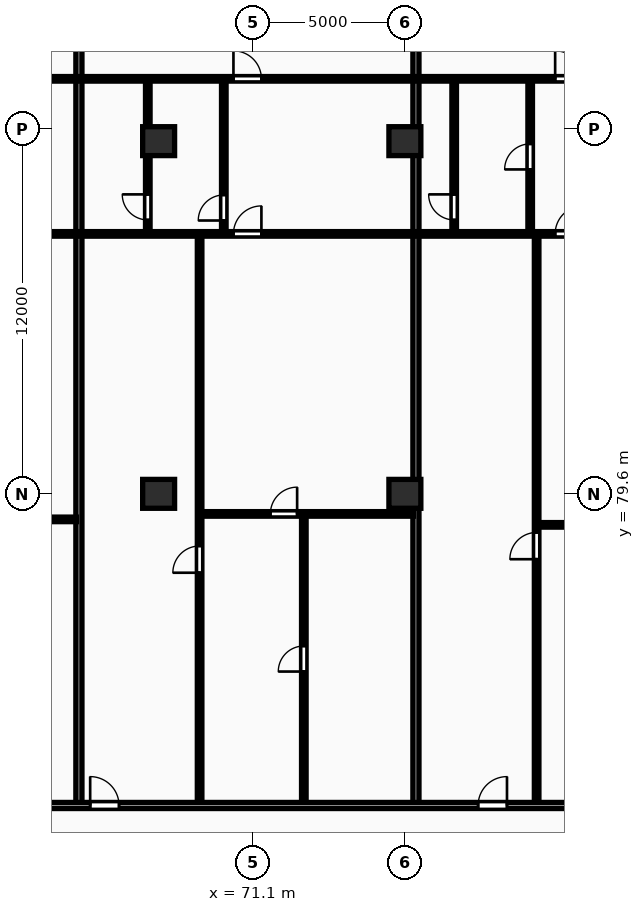
"""IFC4 building model, lengths in metres.
Left out: names, types, materials, properties, quantities, classifications, styles, units other than length and angle.
Written with IfcOpenShell. Run it as: python <this file> out.ifc"""

import sys

from ifc_helpers import new_model, si_unit, direction, frame, frame_2d, origin, origin_2d, place, context, subcontext, project, spatial, rectangle, extrude, element, fill, save


model = new_model("IFC4")
c1 = context("Model", 3, precision=1e-05, world=origin(), true_north=direction((0.0, 1.0)))
c2 = subcontext(c1, "Body", "Model", "MODEL_VIEW")
j1 = project(units=[si_unit("LENGTHUNIT", "METRE"), si_unit("PLANEANGLEUNIT", "RADIAN")], contexts=[c1])
p1 = place(None, origin())
s1 = spatial("IfcSite", under=j1, at=p1, CompositionType="ELEMENT")
p2 = place(p1, origin())
s2 = spatial("IfcBuilding", under=s1, at=p2, CompositionType="ELEMENT")
p3 = place(p2, frame((0.0, 0.0, 24.0)))
s3 = spatial("IfcBuildingStorey", under=s2, at=p3, CompositionType="ELEMENT", Elevation=24.0)
for number, where, z_axis, x_axis in (
    (1, (68.0, 79.6, 0.0), (0.0, 0.0, 1.0), (1.0, 0.0, 0.0)),
    (2, (68.0, 91.2, 0.0), (0.0, 0.0, 1.0), (1.0, 0.0, 0.0)),
    (3, (76.1, 79.6, 0.0), (0.0, 0.0, 1.0), (1.0, 0.0, 0.0)),
    (4, (76.1, 91.2, 0.0), (0.0, 0.0, 1.0), (1.0, 0.0, 0.0)),
):
    element("IfcColumn", number, at=place(p3, frame(where, z_axis=z_axis, x_axis=x_axis)), inside=s3, PredefinedType="COLUMN", context=c2, shape_type="SweptSolid", body=[
        extrude(rectangle(XDim=1.05, YDim=0.95, at=origin_2d()), origin(), (0.0, 0.0, 1.0), 3.25),
    ])
p4 = place(p3, frame((65.378, 69.43, 0.0), z_axis=(0.0, 0.0, 1.0), x_axis=(0.0, 1.0, 0.0)))
e5 = element("IfcWall", 5, at=p4, inside=s3, PredefinedType="PARTITIONING", context=c2, shape_type="SweptSolid", body=[
    extrude(rectangle(XDim=29.07, YDim=0.2, at=frame_2d((14.535, 0.0))), origin(), (0.0, 0.0, 1.0), 2.97),
])
p5 = place(p3, frame((59.33, 78.76, 0.0), z_axis=(0.0, 0.0, 1.0), x_axis=(1.0, 0.0, 0.0)))
e6 = element("IfcWall", 6, at=p5, inside=s3, PredefinedType="PARTITIONING", context=c2, shape_type="SweptSolid", body=[
    extrude(rectangle(XDim=5.968, YDim=0.15, at=frame_2d((2.984, 0.0))), origin(), (0.0, 0.0, 1.0), 2.97),
])
p6 = place(p5, frame((2.544, 0.0, 0.0)))
e7 = element("IfcOpeningElement", 7, at=p6, cuts=e6, PredefinedType="OPENING", context=c2, shape_type="SweptSolid", body=[
    extrude(rectangle(XDim=0.88, YDim=2.06, at=frame_2d((0.44, 1.03))), frame((0.0, 0.085, 0.0), z_axis=(0.0, -1.0, 0.0), x_axis=(1.0, 0.0, 0.0)), (0.0, 0.0, 1.0), 0.17),
])
p7 = place(p3, frame((55.38, 88.15, 0.0), z_axis=(0.0, 0.0, 1.0), x_axis=(1.0, 0.0, 0.0)))
e8 = element("IfcWall", 8, at=p7, inside=s3, PredefinedType="PARTITIONING", context=c2, shape_type="SweptSolid", body=[
    extrude(rectangle(XDim=9.918, YDim=0.15, at=frame_2d((4.959, 0.0))), origin(), (0.0, 0.0, 1.0), 2.97),
])
p8 = place(p7, frame((4.499, 0.0, 0.0)))
e9 = element("IfcOpeningElement", 9, at=p8, cuts=e8, PredefinedType="OPENING", context=c2, shape_type="SweptSolid", body=[
    extrude(rectangle(XDim=0.92, YDim=2.08, at=frame_2d((0.46, 1.04))), frame((0.0, 0.085, 0.0), z_axis=(0.0, -1.0, 0.0), x_axis=(1.0, 0.0, 0.0)), (0.0, 0.0, 1.0), 0.17),
])
p9 = place(p3, frame((55.38, 93.25, 0.0), z_axis=(0.0, 0.0, 1.0), x_axis=(1.0, 0.0, 0.0)))
e10 = element("IfcWall", 10, at=p9, inside=s3, PredefinedType="PARTITIONING", context=c2, shape_type="SweptSolid", body=[
    extrude(rectangle(XDim=9.918, YDim=0.15, at=frame_2d((4.959, 0.0))), origin(), (0.0, 0.0, 1.0), 2.97),
])
p10 = place(p9, frame((6.127, 0.0, 0.0)))
e11 = element("IfcOpeningElement", 11, at=p10, cuts=e10, PredefinedType="OPENING", context=c2, shape_type="SweptSolid", body=[
    extrude(rectangle(XDim=0.92, YDim=2.08, at=frame_2d((0.46, 1.04))), frame((0.0, 0.085, 0.0), z_axis=(0.0, -1.0, 0.0), x_axis=(1.0, 0.0, 0.0)), (0.0, 0.0, 1.0), 0.17),
])
p11 = place(p3, frame((76.464, 69.43, 0.0), z_axis=(0.0, 0.0, 1.0), x_axis=(0.0, 1.0, 0.0)))
e12 = element("IfcWall", 12, at=p11, inside=s3, PredefinedType="PARTITIONING", context=c2, shape_type="SweptSolid", body=[
    extrude(rectangle(XDim=29.07, YDim=0.2, at=frame_2d((14.535, 0.0))), origin(), (0.0, 0.0, 1.0), 2.22),
])
p12 = place(p3, frame((72.776, 69.41, 0.0), z_axis=(0.0, 0.0, 1.0), x_axis=(0.0, 1.0, 0.0)))
e13 = element("IfcWall", 13, at=p12, inside=s3, PredefinedType="PARTITIONING", context=c2, shape_type="SweptSolid", body=[
    extrude(rectangle(XDim=9.53, YDim=0.15, at=frame_2d((4.765, 0.0))), origin(), (0.0, 0.0, 1.0), 2.97),
])
p13 = place(p12, frame((4.345, 0.0, 0.0)))
e14 = element("IfcOpeningElement", 14, at=p13, cuts=e13, PredefinedType="OPENING", context=c2, shape_type="SweptSolid", body=[
    extrude(rectangle(XDim=0.84, YDim=2.04, at=frame_2d((0.42, 1.02))), frame((0.0, 0.085, 0.0), z_axis=(0.0, -1.0, 0.0), x_axis=(1.0, 0.0, 0.0)), (0.0, 0.0, 1.0), 0.17),
])
p14 = place(p3, frame((69.408, 78.94, 0.0), z_axis=(0.0, 0.0, 1.0), x_axis=(1.0, 0.0, 0.0)))
e15 = element("IfcWall", 15, at=p14, inside=s3, PredefinedType="PARTITIONING", context=c2, shape_type="SweptSolid", body=[
    extrude(rectangle(XDim=6.976, YDim=0.15, at=frame_2d((3.488, 0.0))), origin(), (0.0, 0.0, 1.0), 2.97),
])
p15 = place(p14, frame((2.268, 0.0, 0.0)))
e16 = element("IfcOpeningElement", 16, at=p15, cuts=e15, PredefinedType="OPENING", context=c2, shape_type="SweptSolid", body=[
    extrude(rectangle(XDim=0.88, YDim=2.06, at=frame_2d((0.44, 1.03))), frame((0.0, 0.085, 0.0), z_axis=(0.0, -1.0, 0.0), x_axis=(1.0, 0.0, 0.0)), (0.0, 0.0, 1.0), 0.17),
])
p16 = place(p3, frame((69.348, 69.41, 0.0), z_axis=(0.0, 0.0, 1.0), x_axis=(0.0, 1.0, 0.0)))
e17 = element("IfcWall", 17, at=p16, inside=s3, PredefinedType="PARTITIONING", context=c2, shape_type="SweptSolid", body=[
    extrude(rectangle(XDim=18.7, YDim=0.15, at=frame_2d((9.35, 0.0))), origin(), (0.0, 0.0, 1.0), 2.97),
])
p17 = place(p16, frame((7.595, 0.0, 0.0)))
e18 = element("IfcOpeningElement", 18, at=p17, cuts=e17, PredefinedType="OPENING", context=c2, shape_type="SweptSolid", body=[
    extrude(rectangle(XDim=0.88, YDim=2.06, at=frame_2d((0.44, 1.03))), frame((0.0, 0.085, 0.0), z_axis=(0.0, -1.0, 0.0), x_axis=(1.0, 0.0, 0.0)), (0.0, 0.0, 1.0), 0.17),
])
p18 = place(p3, frame((67.644, 88.19, 0.0), z_axis=(0.0, 0.0, 1.0), x_axis=(0.0, 1.0, 0.0)))
e19 = element("IfcWall", 19, at=p18, inside=s3, PredefinedType="PARTITIONING", context=c2, shape_type="SweptSolid", body=[
    extrude(rectangle(XDim=5.0, YDim=0.15, at=frame_2d((2.5, 0.0))), origin(), (0.0, 0.0, 1.0), 2.22),
])
p19 = place(p18, frame((0.419, 0.0, 0.0)))
e20 = element("IfcOpeningElement", 20, at=p19, cuts=e19, PredefinedType="OPENING", context=c2, shape_type="SweptSolid", body=[
    extrude(rectangle(XDim=0.84, YDim=2.04, at=frame_2d((0.42, 1.02))), frame((0.0, 0.085, 0.0), z_axis=(0.0, -1.0, 0.0), x_axis=(1.0, 0.0, 0.0)), (0.0, 0.0, 1.0), 0.17),
])
p20 = place(p3, frame((70.144, 88.19, 0.0), z_axis=(0.0, 0.0, 1.0), x_axis=(0.0, 1.0, 0.0)))
e21 = element("IfcWall", 21, at=p20, inside=s3, PredefinedType="PARTITIONING", context=c2, shape_type="SweptSolid", body=[
    extrude(rectangle(XDim=5.0, YDim=0.15, at=frame_2d((2.5, 0.0))), origin(), (0.0, 0.0, 1.0), 2.97),
])
p21 = place(p20, frame((0.4, 0.0, 0.0)))
e22 = element("IfcOpeningElement", 22, at=p21, cuts=e21, PredefinedType="OPENING", context=c2, shape_type="SweptSolid", body=[
    extrude(rectangle(XDim=0.84, YDim=2.04, at=frame_2d((0.42, 1.02))), frame((0.0, 0.085, 0.0), z_axis=(0.0, -1.0, 0.0), x_axis=(1.0, 0.0, 0.0)), (0.0, 0.0, 1.0), 0.17),
])
p22 = place(p3, frame((65.458, 88.15, 0.0), z_axis=(0.0, 0.0, 1.0), x_axis=(1.0, 0.0, 0.0)))
e23 = element("IfcWall", 23, at=p22, inside=s3, PredefinedType="PARTITIONING", context=c2, shape_type="SweptSolid", body=[
    extrude(rectangle(XDim=10.926, YDim=0.15, at=frame_2d((5.463, 0.0))), origin(), (0.0, 0.0, 1.0), 2.97),
])
p23 = place(p22, frame((5.003, 0.0, 0.0)))
e24 = element("IfcOpeningElement", 24, at=p23, cuts=e23, PredefinedType="OPENING", context=c2, shape_type="SweptSolid", body=[
    extrude(rectangle(XDim=0.92, YDim=2.08, at=frame_2d((0.46, 1.04))), frame((0.0, 0.085, 0.0), z_axis=(0.0, -1.0, 0.0), x_axis=(1.0, 0.0, 0.0)), (0.0, 0.0, 1.0), 0.17),
])
p24 = place(p3, frame((65.458, 93.25, 0.0), z_axis=(0.0, 0.0, 1.0), x_axis=(1.0, 0.0, 0.0)))
e25 = element("IfcWall", 25, at=p24, inside=s3, PredefinedType="PARTITIONING", context=c2, shape_type="SweptSolid", body=[
    extrude(rectangle(XDim=10.926, YDim=0.15, at=frame_2d((5.463, 0.0))), origin(), (0.0, 0.0, 1.0), 2.97),
])
p25 = place(p24, frame((5.003, 0.0, 0.0)))
e26 = element("IfcOpeningElement", 26, at=p25, cuts=e25, PredefinedType="OPENING", context=c2, shape_type="SweptSolid", body=[
    extrude(rectangle(XDim=0.92, YDim=2.08, at=frame_2d((0.46, 1.04))), frame((0.0, 0.085, 0.0), z_axis=(0.0, -1.0, 0.0), x_axis=(1.0, 0.0, 0.0)), (0.0, 0.0, 1.0), 0.17),
])
p26 = place(p3, frame((80.494, 78.58, 0.0), z_axis=(0.0, 0.0, 1.0), x_axis=(1.0, 0.0, 0.0)))
e27 = element("IfcWall", 27, at=p26, inside=s3, PredefinedType="PARTITIONING", context=c2, shape_type="SweptSolid", body=[
    extrude(rectangle(XDim=5.968, YDim=0.15, at=frame_2d((2.984, 0.0))), origin(), (0.0, 0.0, 1.0), 2.97),
])
p27 = place(p26, frame((1.403, 0.0, 0.0)))
e28 = element("IfcOpeningElement", 28, at=p27, cuts=e27, PredefinedType="OPENING", context=c2, shape_type="SweptSolid", body=[
    extrude(rectangle(XDim=0.88, YDim=2.06, at=frame_2d((0.44, 1.03))), frame((0.0, 0.085, 0.0), z_axis=(0.0, -1.0, 0.0), x_axis=(1.0, 0.0, 0.0)), (0.0, 0.0, 1.0), 0.17),
])
p28 = place(p3, frame((80.434, 69.41, 0.0), z_axis=(0.0, 0.0, 1.0), x_axis=(0.0, 1.0, 0.0)))
e29 = element("IfcWall", 29, at=p28, inside=s3, PredefinedType="PARTITIONING", context=c2, shape_type="SweptSolid", body=[
    extrude(rectangle(XDim=18.7, YDim=0.15, at=frame_2d((9.35, 0.0))), origin(), (0.0, 0.0, 1.0), 2.97),
])
p29 = place(p28, frame((8.04, 0.0, 0.0)))
e30 = element("IfcOpeningElement", 30, at=p29, cuts=e29, PredefinedType="OPENING", context=c2, shape_type="SweptSolid", body=[
    extrude(rectangle(XDim=0.88, YDim=2.06, at=frame_2d((0.44, 1.03))), frame((0.0, 0.085, 0.0), z_axis=(0.0, -1.0, 0.0), x_axis=(1.0, 0.0, 0.0)), (0.0, 0.0, 1.0), 0.17),
])
p30 = place(p3, frame((77.721, 88.19, 0.0), z_axis=(0.0, 0.0, 1.0), x_axis=(0.0, 1.0, 0.0)))
e31 = element("IfcWall", 31, at=p30, inside=s3, PredefinedType="PARTITIONING", context=c2, shape_type="SweptSolid", body=[
    extrude(rectangle(XDim=5.0, YDim=0.15, at=frame_2d((2.5, 0.0))), origin(), (0.0, 0.0, 1.0), 2.97),
])
p31 = place(p30, frame((0.419, 0.0, 0.0)))
e32 = element("IfcOpeningElement", 32, at=p31, cuts=e31, PredefinedType="OPENING", context=c2, shape_type="SweptSolid", body=[
    extrude(rectangle(XDim=0.84, YDim=2.04, at=frame_2d((0.42, 1.02))), frame((0.0, 0.085, 0.0), z_axis=(0.0, -1.0, 0.0), x_axis=(1.0, 0.0, 0.0)), (0.0, 0.0, 1.0), 0.17),
])
p32 = place(p3, frame((80.221, 88.19, 0.0), z_axis=(0.0, 0.0, 1.0), x_axis=(0.0, 1.0, 0.0)))
e33 = element("IfcWall", 33, at=p32, inside=s3, PredefinedType="PARTITIONING", context=c2, shape_type="SweptSolid", body=[
    extrude(rectangle(XDim=5.0, YDim=0.15, at=frame_2d((2.5, 0.0))), origin(), (0.0, 0.0, 1.0), 2.97),
])
p33 = place(p32, frame((2.08, 0.0, 0.0)))
e34 = element("IfcOpeningElement", 34, at=p33, cuts=e33, PredefinedType="OPENING", context=c2, shape_type="SweptSolid", body=[
    extrude(rectangle(XDim=0.84, YDim=2.04, at=frame_2d((0.42, 1.02))), frame((0.0, 0.085, 0.0), z_axis=(0.0, -1.0, 0.0), x_axis=(1.0, 0.0, 0.0)), (0.0, 0.0, 1.0), 0.17),
])
p34 = place(p3, frame((76.544, 88.15, 0.0), z_axis=(0.0, 0.0, 1.0), x_axis=(1.0, 0.0, 0.0)))
e35 = element("IfcWall", 35, at=p34, inside=s3, PredefinedType="PARTITIONING", context=c2, shape_type="SweptSolid", body=[
    extrude(rectangle(XDim=9.918, YDim=0.15, at=frame_2d((4.959, 0.0))), origin(), (0.0, 0.0, 1.0), 2.97),
])
p35 = place(p34, frame((4.499, 0.0, 0.0)))
e36 = element("IfcOpeningElement", 36, at=p35, cuts=e35, PredefinedType="OPENING", context=c2, shape_type="SweptSolid", body=[
    extrude(rectangle(XDim=0.92, YDim=2.08, at=frame_2d((0.46, 1.04))), frame((0.0, 0.085, 0.0), z_axis=(0.0, -1.0, 0.0), x_axis=(1.0, 0.0, 0.0)), (0.0, 0.0, 1.0), 0.17),
])
p36 = place(p3, frame((76.544, 93.25, 0.0), z_axis=(0.0, 0.0, 1.0), x_axis=(1.0, 0.0, 0.0)))
e37 = element("IfcWall", 37, at=p36, inside=s3, PredefinedType="PARTITIONING", context=c2, shape_type="SweptSolid", body=[
    extrude(rectangle(XDim=9.918, YDim=0.15, at=frame_2d((4.959, 0.0))), origin(), (0.0, 0.0, 1.0), 2.97),
])
p37 = place(p36, frame((4.499, 0.0, 0.0)))
e38 = element("IfcOpeningElement", 38, at=p37, cuts=e37, PredefinedType="OPENING", context=c2, shape_type="SweptSolid", body=[
    extrude(rectangle(XDim=0.92, YDim=2.08, at=frame_2d((0.46, 1.04))), frame((0.0, 0.085, 0.0), z_axis=(0.0, -1.0, 0.0), x_axis=(1.0, 0.0, 0.0)), (0.0, 0.0, 1.0), 0.17),
])
p38 = place(p3, frame((55.3, 69.35, 0.0), z_axis=(0.0, 0.0, 1.0), x_axis=(1.0, 0.0, 0.0)))
e39 = element("IfcWall", 39, at=p38, inside=s3, PredefinedType="PARTITIONING", context=c2, shape_type="SweptSolid", body=[
    extrude(rectangle(XDim=77.6, YDim=0.2, at=frame_2d((38.8, 0.0))), origin(), (0.0, 0.0, 1.0), 2.97),
])
p39 = place(p38, frame((1.81, 0.0, 0.0)))
e40 = element("IfcOpeningElement", 40, at=p39, cuts=e39, PredefinedType="OPENING", context=c2, shape_type="SweptSolid", body=[
    extrude(rectangle(XDim=0.95, YDim=2.15, at=frame_2d((0.475, 1.075))), frame((0.0, 0.11, 0.0), z_axis=(0.0, -1.0, 0.0), x_axis=(1.0, 0.0, 0.0)), (0.0, 0.0, 1.0), 0.22),
])
p40 = place(p38, frame((10.448, 0.0, 0.0)))
e41 = element("IfcOpeningElement", 41, at=p40, cuts=e39, PredefinedType="OPENING", context=c2, shape_type="SweptSolid", body=[
    extrude(rectangle(XDim=0.95, YDim=2.15, at=frame_2d((0.475, 1.075))), frame((0.0, 0.11, 0.0), z_axis=(0.0, -1.0, 0.0), x_axis=(1.0, 0.0, 0.0)), (0.0, 0.0, 1.0), 0.22),
])
p41 = place(p38, frame((23.208, 0.0, 0.0)))
e42 = element("IfcOpeningElement", 42, at=p41, cuts=e39, PredefinedType="OPENING", context=c2, shape_type="SweptSolid", body=[
    extrude(rectangle(XDim=0.95, YDim=2.15, at=frame_2d((0.475, 1.075))), frame((0.0, 0.11, 0.0), z_axis=(0.0, -1.0, 0.0), x_axis=(1.0, 0.0, 0.0)), (0.0, 0.0, 1.0), 0.22),
])
p42 = place(p38, frame((33.287, 0.0, 0.0)))
e43 = element("IfcOpeningElement", 43, at=p42, cuts=e39, PredefinedType="OPENING", context=c2, shape_type="SweptSolid", body=[
    extrude(rectangle(XDim=0.95, YDim=2.15, at=frame_2d((0.475, 1.075))), frame((0.0, 0.11, 0.0), z_axis=(0.0, -1.0, 0.0), x_axis=(1.0, 0.0, 0.0)), (0.0, 0.0, 1.0), 0.22),
])
p43 = place(p38, frame((44.905, 0.0, 0.0)))
e44 = element("IfcOpeningElement", 44, at=p43, cuts=e39, PredefinedType="OPENING", context=c2, shape_type="SweptSolid", body=[
    extrude(rectangle(XDim=0.95, YDim=2.15, at=frame_2d((0.475, 1.075))), frame((0.0, 0.11, 0.0), z_axis=(0.0, -1.0, 0.0), x_axis=(1.0, 0.0, 0.0)), (0.0, 0.0, 1.0), 0.22),
])
p44 = place(p38, frame((54.119, 0.0, 0.0)))
e45 = element("IfcOpeningElement", 45, at=p44, cuts=e39, PredefinedType="OPENING", context=c2, shape_type="SweptSolid", body=[
    extrude(rectangle(XDim=0.95, YDim=2.15, at=frame_2d((0.475, 1.075))), frame((0.0, 0.11, 0.0), z_axis=(0.0, -1.0, 0.0), x_axis=(1.0, 0.0, 0.0)), (0.0, 0.0, 1.0), 0.22),
])
p45 = place(p38, frame((66.74, 0.0, 0.0)))
e46 = element("IfcOpeningElement", 46, at=p45, cuts=e39, PredefinedType="OPENING", context=c2, shape_type="SweptSolid", body=[
    extrude(rectangle(XDim=0.95, YDim=2.15, at=frame_2d((0.475, 1.075))), frame((0.0, 0.11, 0.0), z_axis=(0.0, -1.0, 0.0), x_axis=(1.0, 0.0, 0.0)), (0.0, 0.0, 1.0), 0.22),
])
p46 = place(p13, origin())
e47 = element("IfcDoor", 47, at=p46, inside=s3, OperationType="SINGLE_SWING_LEFT", PredefinedType="DOOR", context=c2, shape_type="SweptSolid", body=[
    extrude(rectangle(XDim=0.84, YDim=2.04, at=frame_2d((0.42, 1.02))), frame((0.0, 0.025, 0.0), z_axis=(0.0, -1.0, 0.0), x_axis=(1.0, 0.0, 0.0)), (0.0, 0.0, 1.0), 0.05),
])
fill(e14, e47)
p47 = place(p15, origin())
e48 = element("IfcDoor", 48, at=p47, inside=s3, OperationType="SINGLE_SWING_RIGHT", PredefinedType="DOOR", context=c2, shape_type="SweptSolid", body=[
    extrude(rectangle(XDim=0.88, YDim=2.06, at=frame_2d((0.44, 1.03))), frame((0.0, 0.025, 0.0), z_axis=(0.0, -1.0, 0.0), x_axis=(1.0, 0.0, 0.0)), (0.0, 0.0, 1.0), 0.05),
])
fill(e16, e48)
p48 = place(p17, origin())
e49 = element("IfcDoor", 49, at=p48, inside=s3, OperationType="SINGLE_SWING_LEFT", PredefinedType="DOOR", context=c2, shape_type="SweptSolid", body=[
    extrude(rectangle(XDim=0.88, YDim=2.06, at=frame_2d((0.44, 1.03))), frame((0.0, 0.025, 0.0), z_axis=(0.0, -1.0, 0.0), x_axis=(1.0, 0.0, 0.0)), (0.0, 0.0, 1.0), 0.05),
])
fill(e18, e49)
p49 = place(p19, origin())
e50 = element("IfcDoor", 50, at=p49, inside=s3, OperationType="SINGLE_SWING_RIGHT", PredefinedType="DOOR", context=c2, shape_type="SweptSolid", body=[
    extrude(rectangle(XDim=0.84, YDim=2.04, at=frame_2d((0.42, 1.02))), frame((0.0, 0.025, 0.0), z_axis=(0.0, -1.0, 0.0), x_axis=(1.0, 0.0, 0.0)), (0.0, 0.0, 1.0), 0.05),
])
fill(e20, e50)
p50 = place(p21, origin())
e51 = element("IfcDoor", 51, at=p50, inside=s3, OperationType="SINGLE_SWING_LEFT", PredefinedType="DOOR", context=c2, shape_type="SweptSolid", body=[
    extrude(rectangle(XDim=0.84, YDim=2.04, at=frame_2d((0.42, 1.02))), frame((0.0, 0.025, 0.0), z_axis=(0.0, -1.0, 0.0), x_axis=(1.0, 0.0, 0.0)), (0.0, 0.0, 1.0), 0.05),
])
fill(e22, e51)
p51 = place(p23, origin())
e52 = element("IfcDoor", 52, at=p51, inside=s3, OperationType="SINGLE_SWING_RIGHT", PredefinedType="DOOR", context=c2, shape_type="SweptSolid", body=[
    extrude(rectangle(XDim=0.92, YDim=2.08, at=frame_2d((0.46, 1.04))), frame((0.0, 0.025, 0.0), z_axis=(0.0, -1.0, 0.0), x_axis=(1.0, 0.0, 0.0)), (0.0, 0.0, 1.0), 0.05),
])
fill(e24, e52)
p52 = place(p25, origin())
e53 = element("IfcDoor", 53, at=p52, inside=s3, OperationType="SINGLE_SWING_LEFT", PredefinedType="DOOR", context=c2, shape_type="SweptSolid", body=[
    extrude(rectangle(XDim=0.92, YDim=2.08, at=frame_2d((0.46, 1.04))), frame((0.0, 0.025, 0.0), z_axis=(0.0, -1.0, 0.0), x_axis=(1.0, 0.0, 0.0)), (0.0, 0.0, 1.0), 0.05),
])
fill(e26, e53)
p53 = place(p29, origin())
e54 = element("IfcDoor", 54, at=p53, inside=s3, OperationType="SINGLE_SWING_LEFT", PredefinedType="DOOR", context=c2, shape_type="SweptSolid", body=[
    extrude(rectangle(XDim=0.88, YDim=2.06, at=frame_2d((0.44, 1.03))), frame((0.0, 0.025, 0.0), z_axis=(0.0, -1.0, 0.0), x_axis=(1.0, 0.0, 0.0)), (0.0, 0.0, 1.0), 0.05),
])
fill(e30, e54)
p54 = place(p31, origin())
e55 = element("IfcDoor", 55, at=p54, inside=s3, OperationType="SINGLE_SWING_RIGHT", PredefinedType="DOOR", context=c2, shape_type="SweptSolid", body=[
    extrude(rectangle(XDim=0.84, YDim=2.04, at=frame_2d((0.42, 1.02))), frame((0.0, 0.025, 0.0), z_axis=(0.0, -1.0, 0.0), x_axis=(1.0, 0.0, 0.0)), (0.0, 0.0, 1.0), 0.05),
])
fill(e32, e55)
p55 = place(p33, origin())
e56 = element("IfcDoor", 56, at=p55, inside=s3, OperationType="SINGLE_SWING_LEFT", PredefinedType="DOOR", context=c2, shape_type="SweptSolid", body=[
    extrude(rectangle(XDim=0.84, YDim=2.04, at=frame_2d((0.42, 1.02))), frame((0.0, 0.025, 0.0), z_axis=(0.0, -1.0, 0.0), x_axis=(1.0, 0.0, 0.0)), (0.0, 0.0, 1.0), 0.05),
])
fill(e34, e56)
p56 = place(p35, origin())
e57 = element("IfcDoor", 57, at=p56, inside=s3, OperationType="SINGLE_SWING_RIGHT", PredefinedType="DOOR", context=c2, shape_type="SweptSolid", body=[
    extrude(rectangle(XDim=0.92, YDim=2.08, at=frame_2d((0.46, 1.04))), frame((0.0, 0.025, 0.0), z_axis=(0.0, -1.0, 0.0), x_axis=(1.0, 0.0, 0.0)), (0.0, 0.0, 1.0), 0.05),
])
fill(e36, e57)
p57 = place(p37, origin())
e58 = element("IfcDoor", 58, at=p57, inside=s3, OperationType="SINGLE_SWING_LEFT", PredefinedType="DOOR", context=c2, shape_type="SweptSolid", body=[
    extrude(rectangle(XDim=0.92, YDim=2.08, at=frame_2d((0.46, 1.04))), frame((0.0, 0.025, 0.0), z_axis=(0.0, -1.0, 0.0), x_axis=(1.0, 0.0, 0.0)), (0.0, 0.0, 1.0), 0.05),
])
fill(e38, e58)
p58 = place(p40, origin())
e59 = element("IfcDoor", 59, at=p58, inside=s3, OperationType="SINGLE_SWING_LEFT", PredefinedType="DOOR", context=c2, shape_type="SweptSolid", body=[
    extrude(rectangle(XDim=0.95, YDim=2.15, at=frame_2d((0.475, 1.075))), frame((0.0, 0.025, 0.0), z_axis=(0.0, -1.0, 0.0), x_axis=(1.0, 0.0, 0.0)), (0.0, 0.0, 1.0), 0.05),
])
fill(e41, e59)
p59 = place(p41, origin())
e60 = element("IfcDoor", 60, at=p59, inside=s3, OperationType="SINGLE_SWING_RIGHT", PredefinedType="DOOR", context=c2, shape_type="SweptSolid", body=[
    extrude(rectangle(XDim=0.95, YDim=2.15, at=frame_2d((0.475, 1.075))), frame((0.0, 0.025, 0.0), z_axis=(0.0, -1.0, 0.0), x_axis=(1.0, 0.0, 0.0)), (0.0, 0.0, 1.0), 0.05),
])
fill(e42, e60)
save(model, sys.argv[1])
